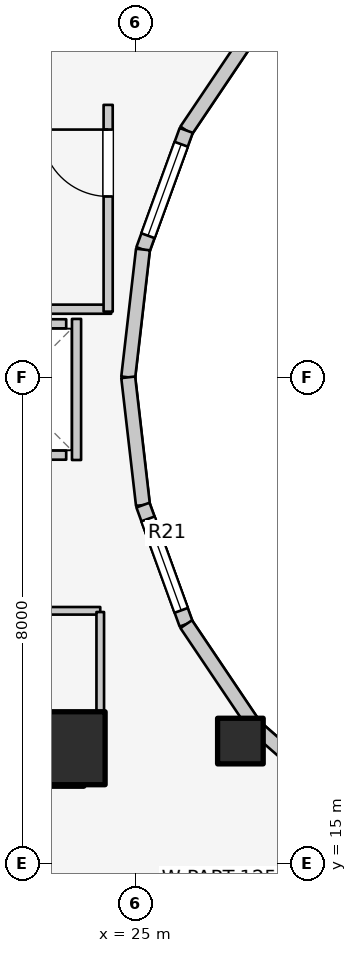
"""IFC4 building model, lengths in metres.
Left out: names, types, materials, properties, quantities, classifications, styles, units other than length and angle.
Written with IfcOpenShell. Run it as: python <this file> out.ifc"""

import sys

from ifc_helpers import new_model, si_unit, direction, frame, frame_2d, origin, origin_2d, place, context, subcontext, project, spatial, rectangle, extrude, element, fill, save


model = new_model("IFC4")
c1 = context("Model", 3, precision=1e-05, world=origin(), true_north=direction((0.0, 1.0)))
c2 = subcontext(c1, "Body", "Model", "MODEL_VIEW")
j1 = project(units=[si_unit("LENGTHUNIT", "METRE"), si_unit("PLANEANGLEUNIT", "RADIAN")], contexts=[c1])
p1 = place(None, origin())
s1 = spatial("IfcSite", under=j1, at=p1, CompositionType="ELEMENT")
p2 = place(p1, origin())
s2 = spatial("IfcBuilding", under=s1, at=p2, CompositionType="ELEMENT")
p3 = place(p2, frame((0.0, 0.0, 183.9)))
s3 = spatial("IfcBuildingStorey", under=s2, at=p3, CompositionType="ELEMENT", Elevation=183.9)
p4 = place(p3, frame((19.65, 16.55, 0.0), z_axis=(0.0, 0.0, 1.0), x_axis=(1.0, 0.0, 0.0)))
e1 = element("IfcWall", 1, at=p4, inside=s3, PredefinedType="SHEAR", context=c2, shape_type="SweptSolid", body=[
    extrude(rectangle(XDim=4.5, YDim=0.55, at=frame_2d((2.25, 0.0))), origin(), (0.0, 0.0, 1.0), 3.1),
])
p5 = place(p3, frame((23.9, 16.9, 0.0), z_axis=(0.0, 0.0, 1.0), x_axis=(1.0, 0.0, 0.0)))
e2 = element("IfcColumn", 2, at=p5, inside=s3, PredefinedType="COLUMN", context=c2, shape_type="SweptSolid", body=[
    extrude(rectangle(XDim=1.2, YDim=1.2, at=origin_2d()), origin(), (0.0, 0.0, 1.0), 3.1),
])
p6 = place(p3, frame((26.725, 17.018, 0.0), z_axis=(0.0, 0.0, 1.0), x_axis=(1.0, 0.0, 0.0)))
e3 = element("IfcColumn", 3, at=p6, inside=s3, PredefinedType="COLUMN", context=c2, shape_type="SweptSolid", body=[
    extrude(rectangle(XDim=0.75, YDim=0.75, at=origin_2d()), origin(), (0.0, 0.0, 1.0), 3.1),
])
p7 = place(p3, frame((26.965, 28.742, 0.0), z_axis=(0.0, 0.0, 1.0), x_axis=(-0.558197800898, -0.829707909492, 0.0)))
e4 = element("IfcWall", 4, at=p7, inside=s3, PredefinedType="STANDARD", context=c2, shape_type="SweptSolid", body=[
    extrude(rectangle(XDim=2.027, YDim=0.23, at=frame_2d((1.013, 0.0))), origin(), (0.0, 0.0, 1.0), 2.16),
])
p8 = place(p3, frame((25.834, 27.06, 0.0), z_axis=(0.0, 0.0, 1.0), x_axis=(-0.341423187295, -0.93990968033, 0.0)))
e5 = element("IfcWall", 5, at=p8, inside=s3, PredefinedType="STANDARD", context=c2, shape_type="SweptSolid", body=[
    extrude(rectangle(XDim=2.084, YDim=0.23, at=frame_2d((1.042, 0.0))), origin(), (0.0, 0.0, 1.0), 2.84),
])
p9 = place(p8, frame((0.242, 0.0, 0.85)))
e6 = element("IfcOpeningElement", 6, at=p9, cuts=e5, PredefinedType="OPENING", context=c2, shape_type="SweptSolid", body=[
    extrude(rectangle(XDim=1.6, YDim=1.65, at=frame_2d((0.8, 0.825))), frame((0.0, 0.125, 0.0), z_axis=(0.0, -1.0, 0.0), x_axis=(1.0, 0.0, 0.0)), (0.0, 0.0, 1.0), 0.25),
])
for number, where, z_axis, x_axis in (
    (7, (25.123, 25.102, 0.0), (0.0, 0.0, 1.0), (-0.115, -0.993, 0.0)),
    (8, (24.88, 23.0, 0.0), (0.0, 0.0, 1.0), (0.115, -0.993, 0.0)),
):
    element("IfcWall", number, at=place(p3, frame(where, z_axis=z_axis, x_axis=x_axis)), inside=s3, PredefinedType="STANDARD", context=c2, shape_type="SweptSolid", body=[
        extrude(rectangle(XDim=2.115, YDim=0.23, at=frame_2d((1.058, 0.0))), origin(), (0.0, 0.0, 1.0), 2.84),
    ])
p10 = place(p3, frame((25.123, 20.898, 0.0), z_axis=(0.0, 0.0, 1.0), x_axis=(0.341423187295, -0.93990968033, 0.0)))
e9 = element("IfcWall", 9, at=p10, inside=s3, PredefinedType="STANDARD", context=c2, shape_type="SweptSolid", body=[
    extrude(rectangle(XDim=2.084, YDim=0.23, at=frame_2d((1.042, 0.0))), origin(), (0.0, 0.0, 1.0), 2.84),
])
p11 = place(p10, frame((0.242, 0.0, 0.85)))
e10 = element("IfcOpeningElement", 10, at=p11, cuts=e9, PredefinedType="OPENING", context=c2, shape_type="SweptSolid", body=[
    extrude(rectangle(XDim=1.6, YDim=1.65, at=frame_2d((0.8, 0.825))), frame((0.0, 0.125, 0.0), z_axis=(0.0, -1.0, 0.0), x_axis=(1.0, 0.0, 0.0)), (0.0, 0.0, 1.0), 0.25),
])
p12 = place(p3, frame((25.834, 18.94, 0.0), z_axis=(0.0, 0.0, 1.0), x_axis=(0.558197800898, -0.829707909492, 0.0)))
e11 = element("IfcWall", 11, at=p12, inside=s3, PredefinedType="STANDARD", context=c2, shape_type="SweptSolid", body=[
    extrude(rectangle(XDim=2.027, YDim=0.23, at=frame_2d((1.013, 0.0))), origin(), (0.0, 0.0, 1.0), 2.16),
])
p13 = place(p3, frame((26.965, 17.258, 0.0), z_axis=(0.0, 0.0, 1.0), x_axis=(0.752576694707, -0.658504607869, 0.0)))
e12 = element("IfcWall", 12, at=p13, inside=s3, PredefinedType="STANDARD", context=c2, shape_type="SweptSolid", body=[
    extrude(rectangle(XDim=1.959, YDim=0.23, at=frame_2d((0.98, 0.0))), origin(), (0.0, 0.0, 1.0), 2.16),
])
for number, where, z_axis, x_axis in (
    (13, (22.04, 21.72, 0.0), (0.0, 0.0, 1.0), (1.0, 0.0, 0.0)),
    (14, (22.04, 23.88, 0.0), (0.0, 0.0, 1.0), (1.0, 0.0, 0.0)),
):
    element("IfcWall", number, at=place(p3, frame(where, z_axis=z_axis, x_axis=x_axis)), inside=s3, PredefinedType="SOLIDWALL", context=c2, shape_type="SweptSolid", body=[
        extrude(rectangle(XDim=1.82, YDim=0.15, at=frame_2d((0.91, 0.0))), origin(), (0.0, 0.0, 1.0), 2.12),
    ])
p14 = place(p3, frame((24.03, 21.64, 0.0), z_axis=(0.0, 0.0, 1.0), x_axis=(0.0, 1.0, 0.0)))
e15 = element("IfcWall", 15, at=p14, inside=s3, PredefinedType="SOLIDWALL", context=c2, shape_type="SweptSolid", body=[
    extrude(rectangle(XDim=2.32, YDim=0.15, at=frame_2d((1.16, 0.0))), origin(), (0.0, 0.0, 1.0), 2.12),
])
p15 = place(p3, frame((19.52, 24.12, 0.0), z_axis=(0.0, 0.0, 1.0), x_axis=(1.0, 0.0, 0.0)))
e16 = element("IfcWall", 16, at=p15, inside=s3, PredefinedType="PARTITIONING", context=c2, shape_type="SweptSolid", body=[
    extrude(rectangle(XDim=5.08, YDim=0.15, at=frame_2d((2.54, 0.0))), origin(), (0.0, 0.0, 1.0), 2.12),
])
p16 = place(p3, frame((24.55, 24.08, 0.0), z_axis=(0.0, 0.0, 1.0), x_axis=(0.0, 1.0, 0.0)))
e17 = element("IfcWall", 17, at=p16, inside=s3, PredefinedType="PARTITIONING", context=c2, shape_type="SweptSolid", body=[
    extrude(rectangle(XDim=3.4, YDim=0.15, at=frame_2d((1.7, 0.0))), origin(), (0.0, 0.0, 1.0), 2.855),
])
p17 = place(p16, frame((1.894, 0.0, 0.0)))
e18 = element("IfcOpeningElement", 18, at=p17, cuts=e17, PredefinedType="OPENING", context=c2, shape_type="SweptSolid", body=[
    extrude(rectangle(XDim=1.1, YDim=2.1, at=frame_2d((0.55, 1.05))), frame((0.0, 0.085, 0.0), z_axis=(0.0, -1.0, 0.0), x_axis=(1.0, 0.0, 0.0)), (0.0, 0.0, 1.0), 0.17),
])
p18 = place(p3, frame((19.55, 19.16, 0.0), z_axis=(0.0, 0.0, 1.0), x_axis=(1.0, 0.0, 0.0)))
e19 = element("IfcWall", 19, at=p18, inside=s3, PredefinedType="PARTITIONING", context=c2, shape_type="SweptSolid", body=[
    extrude(rectangle(XDim=4.87, YDim=0.125, at=frame_2d((2.435, 0.0))), origin(), (0.0, 0.0, 1.0), 2.12),
])
p19 = place(p18, frame((0.55, 0.0, 0.0)))
e20 = element("IfcOpeningElement", 20, at=p19, cuts=e19, PredefinedType="OPENING", context=c2, shape_type="SweptSolid", body=[
    extrude(rectangle(XDim=0.85, YDim=2.05, at=frame_2d((0.425, 1.025))), frame((0.0, 0.073, 0.0), z_axis=(0.0, -1.0, 0.0), x_axis=(1.0, 0.0, 0.0)), (0.0, 0.0, 1.0), 0.145),
])
p20 = place(p3, frame((24.42, 17.1, 0.0), z_axis=(0.0, 0.0, 1.0), x_axis=(0.0, 1.0, 0.0)))
e21 = element("IfcWall", 21, at=p20, inside=s3, PredefinedType="PARTITIONING", context=c2, shape_type="SweptSolid", body=[
    extrude(rectangle(XDim=2.04, YDim=0.125, at=frame_2d((1.02, 0.0))), origin(), (0.0, 0.0, 1.0), 2.232),
])
p21 = place(p3, frame((28.45, 15.985, 0.0), z_axis=(0.0, 0.0, 1.0), x_axis=(-0.525627246902, -0.850714991824, 0.0)))
e22 = element("IfcWall", 22, at=p21, inside=s3, PredefinedType="PARTITIONING", context=c2, shape_type="SweptSolid", body=[
    extrude(rectangle(XDim=2.901, YDim=0.125, at=frame_2d((1.451, 0.0))), origin(), (0.0, 0.0, 1.0), 2.299),
])
p22 = place(p9, origin())
e23 = element("IfcWindow", 23, at=p22, inside=s3, PartitioningType="SINGLE_PANEL", PredefinedType="WINDOW", context=c2, shape_type="SweptSolid", body=[
    extrude(rectangle(XDim=1.6, YDim=1.65, at=frame_2d((0.8, 0.825))), frame((0.0, 0.03, 0.0), z_axis=(0.0, -1.0, 0.0), x_axis=(1.0, 0.0, 0.0)), (0.0, 0.0, 1.0), 0.06),
])
fill(e6, e23)
p23 = place(p11, origin())
e24 = element("IfcWindow", 24, at=p23, inside=s3, PartitioningType="SINGLE_PANEL", PredefinedType="WINDOW", context=c2, shape_type="SweptSolid", body=[
    extrude(rectangle(XDim=1.6, YDim=1.65, at=frame_2d((0.8, 0.825))), frame((0.0, 0.03, 0.0), z_axis=(0.0, -1.0, 0.0), x_axis=(1.0, 0.0, 0.0)), (0.0, 0.0, 1.0), 0.06),
])
fill(e10, e24)
p24 = place(p17, origin())
e25 = element("IfcDoor", 25, at=p24, inside=s3, OperationType="SINGLE_SWING_RIGHT", PredefinedType="DOOR", context=c2, shape_type="SweptSolid", body=[
    extrude(rectangle(XDim=1.1, YDim=2.1, at=frame_2d((0.55, 1.05))), frame((0.0, 0.025, 0.0), z_axis=(0.0, -1.0, 0.0), x_axis=(1.0, 0.0, 0.0)), (0.0, 0.0, 1.0), 0.05),
])
fill(e18, e25)
save(model, sys.argv[1])
